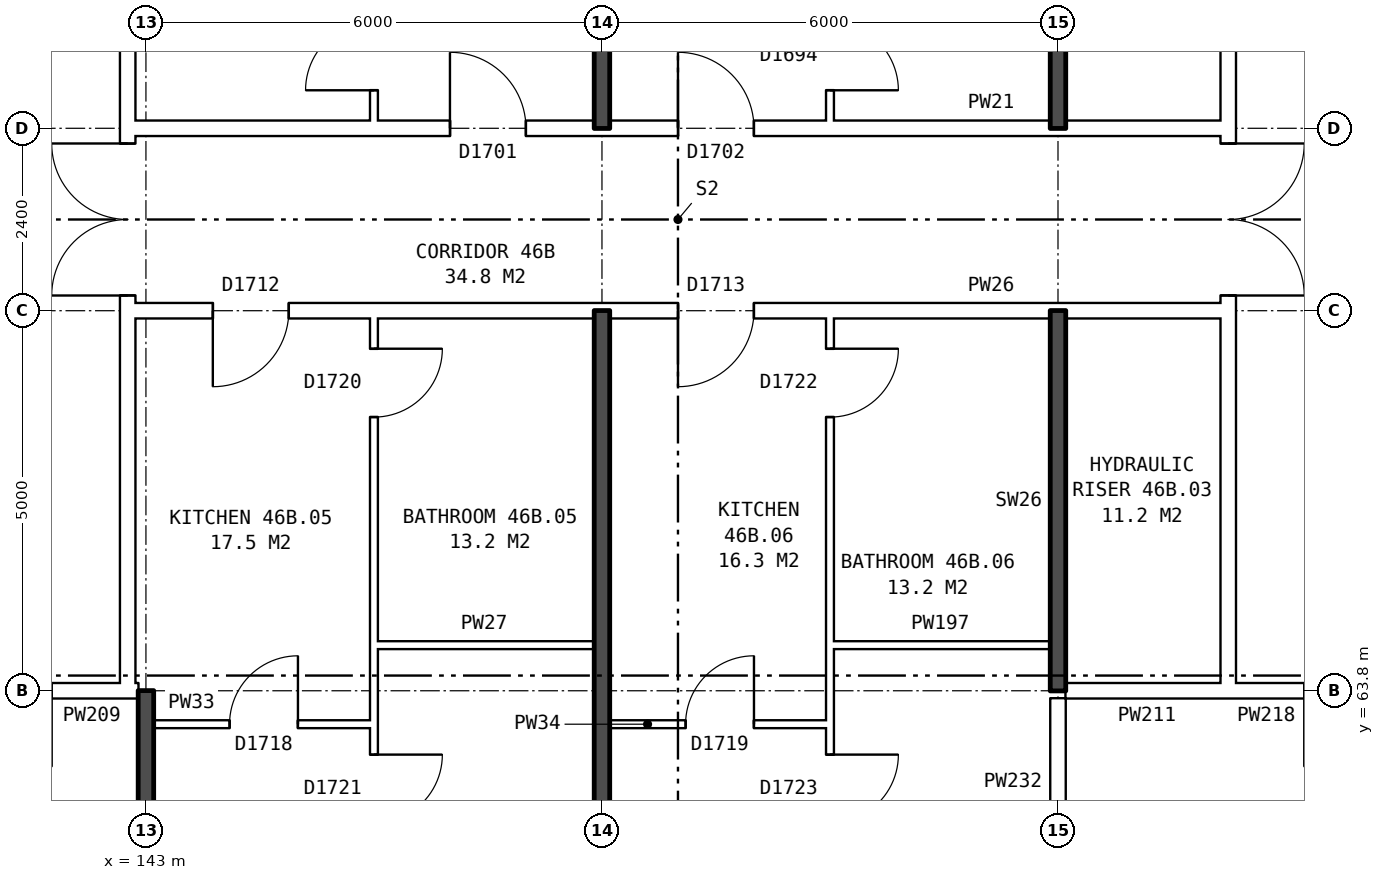
"""IFC4 building model, lengths in metres.
Left out: names, types, materials, properties, quantities, classifications, styles, units other than length and angle.
Written with IfcOpenShell. Run it as: python <this file> out.ifc"""

import sys

from ifc_helpers import new_model, si_unit, direction, frame, frame_2d, origin, place, context, subcontext, project, spatial, rectangle, extrude, element, fill, save


model = new_model("IFC4")
c1 = context("Model", 3, precision=1e-05, world=origin(), true_north=direction((0.0, 1.0)))
c2 = subcontext(c1, "Body", "Model", "MODEL_VIEW")
j1 = project(units=[si_unit("LENGTHUNIT", "METRE"), si_unit("PLANEANGLEUNIT", "RADIAN")], contexts=[c1])
p1 = place(None, origin())
s1 = spatial("IfcSite", under=j1, at=p1, CompositionType="ELEMENT")
p2 = place(p1, origin())
s2 = spatial("IfcBuilding", under=s1, at=p2, CompositionType="ELEMENT")
p3 = place(p2, frame((0.0, 0.0, 164.0)))
s3 = spatial("IfcBuildingStorey", under=s2, at=p3, CompositionType="ELEMENT", Elevation=164.0)
p4 = place(p3, frame((142.76, 63.9, 0.0), z_axis=(0.0, 0.0, 1.0), x_axis=(0.0, 1.0, 0.0)))
e1 = element("IfcWall", 1, at=p4, inside=s3, PredefinedType="PARTITIONING", context=c2, shape_type="SweptSolid", body=[
    extrude(rectangle(XDim=12.2, YDim=0.2, at=frame_2d((6.1, 0.0))), origin(), (0.0, 0.0, 1.0), 2.85),
])
p5 = place(p4, frame((5.1, 0.0, 0.0)))
e2 = element("IfcOpeningElement", 2, at=p5, cuts=e1, PredefinedType="OPENING", context=c2, shape_type="SweptSolid", body=[
    extrude(rectangle(XDim=2.0, YDim=2.1, at=frame_2d((1.0, 1.05))), frame((0.0, 0.11, 0.0), z_axis=(0.0, -1.0, 0.0), x_axis=(1.0, 0.0, 0.0)), (0.0, 0.0, 1.0), 0.22),
])
p6 = place(p3, frame((157.24, 63.9, 0.0), z_axis=(0.0, 0.0, 1.0), x_axis=(0.0, 1.0, 0.0)))
e3 = element("IfcWall", 3, at=p6, inside=s3, PredefinedType="PARTITIONING", context=c2, shape_type="SweptSolid", body=[
    extrude(rectangle(XDim=12.2, YDim=0.2, at=frame_2d((6.1, 0.0))), origin(), (0.0, 0.0, 1.0), 2.85),
])
p7 = place(p6, frame((5.1, 0.0, 0.0)))
e4 = element("IfcOpeningElement", 4, at=p7, cuts=e3, PredefinedType="OPENING", context=c2, shape_type="SweptSolid", body=[
    extrude(rectangle(XDim=2.0, YDim=2.1, at=frame_2d((1.0, 1.05))), frame((0.0, 0.11, 0.0), z_axis=(0.0, -1.0, 0.0), x_axis=(1.0, 0.0, 0.0)), (0.0, 0.0, 1.0), 0.22),
])
p8 = place(p3, frame((143.1, 63.36, 0.0), z_axis=(0.0, 0.0, 1.0), x_axis=(1.0, 0.0, 0.0)))
e5 = element("IfcWall", 5, at=p8, inside=s3, PredefinedType="PARTITIONING", context=c2, shape_type="SweptSolid", body=[
    extrude(rectangle(XDim=2.9, YDim=0.1, at=frame_2d((1.45, 0.0))), origin(), (0.0, 0.0, 1.0), 2.85),
])
p9 = place(p8, frame((1.0, 0.0, 0.0)))
e6 = element("IfcOpeningElement", 6, at=p9, cuts=e5, PredefinedType="OPENING", context=c2, shape_type="SweptSolid", body=[
    extrude(rectangle(XDim=0.9, YDim=2.1, at=frame_2d((0.45, 1.05))), frame((0.0, 0.06, 0.0), z_axis=(0.0, -1.0, 0.0), x_axis=(1.0, 0.0, 0.0)), (0.0, 0.0, 1.0), 0.12),
])
p10 = place(p3, frame((149.1, 63.36, 0.0), z_axis=(0.0, 0.0, 1.0), x_axis=(1.0, 0.0, 0.0)))
e7 = element("IfcWall", 7, at=p10, inside=s3, PredefinedType="PARTITIONING", context=c2, shape_type="SweptSolid", body=[
    extrude(rectangle(XDim=2.9, YDim=0.1, at=frame_2d((1.45, 0.0))), origin(), (0.0, 0.0, 1.0), 2.85),
])
p11 = place(p10, frame((1.0, 0.0, 0.0)))
e8 = element("IfcOpeningElement", 8, at=p11, cuts=e7, PredefinedType="OPENING", context=c2, shape_type="SweptSolid", body=[
    extrude(rectangle(XDim=0.9, YDim=2.1, at=frame_2d((0.45, 1.05))), frame((0.0, 0.06, 0.0), z_axis=(0.0, -1.0, 0.0), x_axis=(1.0, 0.0, 0.0)), (0.0, 0.0, 1.0), 0.12),
])
p12 = place(p3, frame((139.76, 63.8, 0.0), z_axis=(0.0, 0.0, 1.0), x_axis=(1.0, 0.0, 0.0)))
e9 = element("IfcWall", 9, at=p12, inside=s3, PredefinedType="PARTITIONING", context=c2, shape_type="SweptSolid", body=[
    extrude(rectangle(XDim=3.0, YDim=0.2, at=frame_2d((1.5, 0.0))), origin(), (0.0, 0.0, 1.0), 2.85),
])
p13 = place(p12, frame((1.0, 0.0, 0.0)))
e10 = element("IfcOpeningElement", 10, at=p13, cuts=e9, PredefinedType="OPENING", context=c2, shape_type="SweptSolid", body=[
    extrude(rectangle(XDim=1.0, YDim=2.1, at=frame_2d((0.5, 1.05))), frame((0.0, 0.11, 0.0), z_axis=(0.0, -1.0, 0.0), x_axis=(1.0, 0.0, 0.0)), (0.0, 0.0, 1.0), 0.22),
])
p14 = place(p3, frame((142.76, 63.8, 0.0), z_axis=(0.0, 0.0, 1.0), x_axis=(1.0, 0.0, 0.0)))
e11 = element("IfcWall", 11, at=p14, inside=s3, PredefinedType="PARTITIONING", context=c2, shape_type="SweptSolid", body=[
    extrude(rectangle(XDim=0.14, YDim=0.2, at=frame_2d((0.07, 0.0))), origin(), (0.0, 0.0, 1.0), 2.85),
])
p15 = place(p3, frame((155.1, 63.8, 0.0), z_axis=(0.0, 0.0, 1.0), x_axis=(1.0, 0.0, 0.0)))
e12 = element("IfcWall", 12, at=p15, inside=s3, PredefinedType="PARTITIONING", context=c2, shape_type="SweptSolid", body=[
    extrude(rectangle(XDim=2.14, YDim=0.2, at=frame_2d((1.07, 0.0))), origin(), (0.0, 0.0, 1.0), 2.85),
])
p16 = place(p3, frame((157.24, 63.8, 0.0), z_axis=(0.0, 0.0, 1.0), x_axis=(1.0, 0.0, 0.0)))
e13 = element("IfcWall", 13, at=p16, inside=s3, PredefinedType="PARTITIONING", context=c2, shape_type="SweptSolid", body=[
    extrude(rectangle(XDim=3.0, YDim=0.2, at=frame_2d((1.5, 0.0))), origin(), (0.0, 0.0, 1.0), 2.85),
])
p17 = place(p16, frame((1.0, 0.0, 0.0)))
e14 = element("IfcOpeningElement", 14, at=p17, cuts=e13, PredefinedType="OPENING", context=c2, shape_type="SweptSolid", body=[
    extrude(rectangle(XDim=1.0, YDim=2.1, at=frame_2d((0.5, 1.05))), frame((0.0, 0.11, 0.0), z_axis=(0.0, -1.0, 0.0), x_axis=(1.0, 0.0, 0.0)), (0.0, 0.0, 1.0), 0.22),
])
for number, where, z_axis, x_axis in (
    (15, (146.0, 64.4, 0.0), (0.0, 0.0, 1.0), (1.0, 0.0, 0.0)),
    (16, (152.0, 64.4, 0.0), (0.0, 0.0, 1.0), (1.0, 0.0, 0.0)),
):
    element("IfcWall", number, at=place(p3, frame(where, z_axis=z_axis, x_axis=x_axis)), inside=s3, PredefinedType="PARTITIONING", context=c2, shape_type="SweptSolid", body=[
        extrude(rectangle(XDim=2.9, YDim=0.1, at=frame_2d((1.45, 0.0))), origin(), (0.0, 0.0, 1.0), 2.85),
    ])
p18 = place(p3, frame((142.76, 68.8, 0.0), z_axis=(0.0, 0.0, 1.0), x_axis=(1.0, 0.0, 0.0)))
e17 = element("IfcWall", 17, at=p18, inside=s3, PredefinedType="PARTITIONING", context=c2, shape_type="SweptSolid", body=[
    extrude(rectangle(XDim=14.48, YDim=0.2, at=frame_2d((7.24, 0.0))), origin(), (0.0, 0.0, 1.0), 2.85),
])
p19 = place(p18, frame((1.12, 0.0, 0.0)))
e18 = element("IfcOpeningElement", 18, at=p19, cuts=e17, PredefinedType="OPENING", context=c2, shape_type="SweptSolid", body=[
    extrude(rectangle(XDim=1.0, YDim=2.1, at=frame_2d((0.5, 1.05))), frame((0.0, 0.11, 0.0), z_axis=(0.0, -1.0, 0.0), x_axis=(1.0, 0.0, 0.0)), (0.0, 0.0, 1.0), 0.22),
])
p20 = place(p18, frame((7.24, 0.0, 0.0)))
e19 = element("IfcOpeningElement", 19, at=p20, cuts=e17, PredefinedType="OPENING", context=c2, shape_type="SweptSolid", body=[
    extrude(rectangle(XDim=1.0, YDim=2.1, at=frame_2d((0.5, 1.05))), frame((0.0, 0.11, 0.0), z_axis=(0.0, -1.0, 0.0), x_axis=(1.0, 0.0, 0.0)), (0.0, 0.0, 1.0), 0.22),
])
p21 = place(p3, frame((142.76, 71.2, 0.0), z_axis=(0.0, 0.0, 1.0), x_axis=(1.0, 0.0, 0.0)))
e20 = element("IfcWall", 20, at=p21, inside=s3, PredefinedType="PARTITIONING", context=c2, shape_type="SweptSolid", body=[
    extrude(rectangle(XDim=14.48, YDim=0.2, at=frame_2d((7.24, 0.0))), origin(), (0.0, 0.0, 1.0), 2.85),
])
p22 = place(p21, frame((4.24, 0.0, 0.0)))
e21 = element("IfcOpeningElement", 21, at=p22, cuts=e20, PredefinedType="OPENING", context=c2, shape_type="SweptSolid", body=[
    extrude(rectangle(XDim=1.0, YDim=2.1, at=frame_2d((0.5, 1.05))), frame((0.0, 0.11, 0.0), z_axis=(0.0, -1.0, 0.0), x_axis=(1.0, 0.0, 0.0)), (0.0, 0.0, 1.0), 0.22),
])
p23 = place(p21, frame((7.24, 0.0, 0.0)))
e22 = element("IfcOpeningElement", 22, at=p23, cuts=e20, PredefinedType="OPENING", context=c2, shape_type="SweptSolid", body=[
    extrude(rectangle(XDim=1.0, YDim=2.1, at=frame_2d((0.5, 1.05))), frame((0.0, 0.11, 0.0), z_axis=(0.0, -1.0, 0.0), x_axis=(1.0, 0.0, 0.0)), (0.0, 0.0, 1.0), 0.22),
])
p24 = place(p3, frame((143.0, 54.36, 0.0), z_axis=(0.0, 0.0, 1.0), x_axis=(0.0, 1.0, 0.0)))
e23 = element("IfcWall", 23, at=p24, inside=s3, PredefinedType="SOLIDWALL", context=c2, shape_type="SweptSolid", body=[
    extrude(rectangle(XDim=9.44, YDim=0.2, at=frame_2d((4.72, 0.0))), origin(), (0.0, 0.0, 1.0), 2.85),
])
p25 = place(p3, frame((146.0, 54.36, 0.0), z_axis=(0.0, 0.0, 1.0), x_axis=(0.0, 1.0, 0.0)))
e24 = element("IfcWall", 24, at=p25, inside=s3, PredefinedType="PARTITIONING", context=c2, shape_type="SweptSolid", body=[
    extrude(rectangle(XDim=14.34, YDim=0.1, at=frame_2d((7.17, 0.0))), origin(), (0.0, 0.0, 1.0), 2.85),
])
p26 = place(p25, frame((7.7, 0.0, 0.0)))
e25 = element("IfcOpeningElement", 25, at=p26, cuts=e24, PredefinedType="OPENING", context=c2, shape_type="SweptSolid", body=[
    extrude(rectangle(XDim=0.9, YDim=2.1, at=frame_2d((0.45, 1.05))), frame((0.0, 0.06, 0.0), z_axis=(0.0, -1.0, 0.0), x_axis=(1.0, 0.0, 0.0)), (0.0, 0.0, 1.0), 0.12),
])
p27 = place(p25, frame((13.04, 0.0, 0.0)))
e26 = element("IfcOpeningElement", 26, at=p27, cuts=e24, PredefinedType="OPENING", context=c2, shape_type="SweptSolid", body=[
    extrude(rectangle(XDim=0.9, YDim=2.1, at=frame_2d((0.45, 1.05))), frame((0.0, 0.06, 0.0), z_axis=(0.0, -1.0, 0.0), x_axis=(1.0, 0.0, 0.0)), (0.0, 0.0, 1.0), 0.12),
])
p28 = place(p3, frame((146.0, 71.3, 0.0), z_axis=(0.0, 0.0, 1.0), x_axis=(0.0, 1.0, 0.0)))
e27 = element("IfcWall", 27, at=p28, inside=s3, PredefinedType="PARTITIONING", context=c2, shape_type="SweptSolid", body=[
    extrude(rectangle(XDim=14.34, YDim=0.1, at=frame_2d((7.17, 0.0))), origin(), (0.0, 0.0, 1.0), 2.85),
])
p29 = place(p28, frame((9.24, 0.0, 0.0)))
e28 = element("IfcOpeningElement", 28, at=p29, cuts=e27, PredefinedType="OPENING", context=c2, shape_type="SweptSolid", body=[
    extrude(rectangle(XDim=0.9, YDim=2.1, at=frame_2d((0.45, 1.05))), frame((0.0, 0.06, 0.0), z_axis=(0.0, -1.0, 0.0), x_axis=(1.0, 0.0, 0.0)), (0.0, 0.0, 1.0), 0.12),
])
p30 = place(p28, frame((0.4, 0.0, 0.0)))
e29 = element("IfcOpeningElement", 29, at=p30, cuts=e27, PredefinedType="OPENING", context=c2, shape_type="SweptSolid", body=[
    extrude(rectangle(XDim=0.9, YDim=2.1, at=frame_2d((0.45, 1.05))), frame((0.0, 0.06, 0.0), z_axis=(0.0, -1.0, 0.0), x_axis=(1.0, 0.0, 0.0)), (0.0, 0.0, 1.0), 0.12),
])
for number, where, z_axis, x_axis in (
    (30, (149.0, 54.36, 0.0), (0.0, 0.0, 1.0), (0.0, 1.0, 0.0)),
    (31, (149.0, 71.2, 0.0), (0.0, 0.0, 1.0), (0.0, 1.0, 0.0)),
):
    element("IfcWall", number, at=place(p3, frame(where, z_axis=z_axis, x_axis=x_axis)), inside=s3, PredefinedType="SOLIDWALL", context=c2, shape_type="SweptSolid", body=[
        extrude(rectangle(XDim=14.44, YDim=0.2, at=frame_2d((7.22, 0.0))), origin(), (0.0, 0.0, 1.0), 2.85),
    ])
p31 = place(p3, frame((152.0, 54.36, 0.0), z_axis=(0.0, 0.0, 1.0), x_axis=(0.0, 1.0, 0.0)))
e32 = element("IfcWall", 32, at=p31, inside=s3, PredefinedType="PARTITIONING", context=c2, shape_type="SweptSolid", body=[
    extrude(rectangle(XDim=14.34, YDim=0.1, at=frame_2d((7.17, 0.0))), origin(), (0.0, 0.0, 1.0), 2.85),
])
p32 = place(p31, frame((7.7, 0.0, 0.0)))
e33 = element("IfcOpeningElement", 33, at=p32, cuts=e32, PredefinedType="OPENING", context=c2, shape_type="SweptSolid", body=[
    extrude(rectangle(XDim=0.9, YDim=2.1, at=frame_2d((0.45, 1.05))), frame((0.0, 0.06, 0.0), z_axis=(0.0, -1.0, 0.0), x_axis=(1.0, 0.0, 0.0)), (0.0, 0.0, 1.0), 0.12),
])
p33 = place(p31, frame((13.04, 0.0, 0.0)))
e34 = element("IfcOpeningElement", 34, at=p33, cuts=e32, PredefinedType="OPENING", context=c2, shape_type="SweptSolid", body=[
    extrude(rectangle(XDim=0.9, YDim=2.1, at=frame_2d((0.45, 1.05))), frame((0.0, 0.06, 0.0), z_axis=(0.0, -1.0, 0.0), x_axis=(1.0, 0.0, 0.0)), (0.0, 0.0, 1.0), 0.12),
])
p34 = place(p3, frame((152.0, 71.3, 0.0), z_axis=(0.0, 0.0, 1.0), x_axis=(0.0, 1.0, 0.0)))
e35 = element("IfcWall", 35, at=p34, inside=s3, PredefinedType="PARTITIONING", context=c2, shape_type="SweptSolid", body=[
    extrude(rectangle(XDim=14.34, YDim=0.1, at=frame_2d((7.17, 0.0))), origin(), (0.0, 0.0, 1.0), 2.85),
])
p35 = place(p34, frame((9.24, 0.0, 0.0)))
e36 = element("IfcOpeningElement", 36, at=p35, cuts=e35, PredefinedType="OPENING", context=c2, shape_type="SweptSolid", body=[
    extrude(rectangle(XDim=0.9, YDim=2.1, at=frame_2d((0.45, 1.05))), frame((0.0, 0.06, 0.0), z_axis=(0.0, -1.0, 0.0), x_axis=(1.0, 0.0, 0.0)), (0.0, 0.0, 1.0), 0.12),
])
p36 = place(p34, frame((0.4, 0.0, 0.0)))
e37 = element("IfcOpeningElement", 37, at=p36, cuts=e35, PredefinedType="OPENING", context=c2, shape_type="SweptSolid", body=[
    extrude(rectangle(XDim=0.9, YDim=2.1, at=frame_2d((0.45, 1.05))), frame((0.0, 0.06, 0.0), z_axis=(0.0, -1.0, 0.0), x_axis=(1.0, 0.0, 0.0)), (0.0, 0.0, 1.0), 0.12),
])
p37 = place(p3, frame((155.0, 61.5, 0.0), z_axis=(0.0, 0.0, 1.0), x_axis=(0.0, 1.0, 0.0)))
e38 = element("IfcWall", 38, at=p37, inside=s3, PredefinedType="PARTITIONING", context=c2, shape_type="SweptSolid", body=[
    extrude(rectangle(XDim=2.2, YDim=0.2, at=frame_2d((1.1, 0.0))), origin(), (0.0, 0.0, 1.0), 2.85),
])
for number, where, z_axis, x_axis in (
    (39, (155.0, 63.8, 0.0), (0.0, 0.0, 1.0), (0.0, 1.0, 0.0)),
    (40, (155.0, 71.2, 0.0), (0.0, 0.0, 1.0), (0.0, 1.0, 0.0)),
):
    element("IfcWall", number, at=place(p3, frame(where, z_axis=z_axis, x_axis=x_axis)), inside=s3, PredefinedType="SOLIDWALL", context=c2, shape_type="SweptSolid", body=[
        extrude(rectangle(XDim=5.0, YDim=0.2, at=frame_2d((2.5, 0.0))), origin(), (0.0, 0.0, 1.0), 2.85),
    ])
p38 = place(p5, origin())
e41 = element("IfcDoor", 41, at=p38, inside=s3, OperationType="DOUBLE_DOOR_SINGLE_SWING", PredefinedType="DOOR", context=c2, shape_type="SweptSolid", body=[
    extrude(rectangle(XDim=2.0, YDim=2.1, at=frame_2d((1.0, 1.05))), frame((0.0, 0.025, 0.0), z_axis=(0.0, -1.0, 0.0), x_axis=(1.0, 0.0, 0.0)), (0.0, 0.0, 1.0), 0.05),
])
fill(e2, e41)
p39 = place(p7, frame((2.0, 0.0, 0.0), z_axis=(0.0, 0.0, 1.0), x_axis=(-1.0, 0.0, 0.0)))
e42 = element("IfcDoor", 42, at=p39, inside=s3, OperationType="DOUBLE_DOOR_SINGLE_SWING", PredefinedType="DOOR", context=c2, shape_type="SweptSolid", body=[
    extrude(rectangle(XDim=2.0, YDim=2.1, at=frame_2d((1.0, 1.05))), frame((0.0, 0.025, 0.0), z_axis=(0.0, -1.0, 0.0), x_axis=(1.0, 0.0, 0.0)), (0.0, 0.0, 1.0), 0.05),
])
fill(e4, e42)
p40 = place(p26, frame((0.9, 0.0, 0.0), z_axis=(0.0, 0.0, 1.0), x_axis=(-1.0, 0.0, 0.0)))
e43 = element("IfcDoor", 43, at=p40, inside=s3, OperationType="SINGLE_SWING_LEFT", PredefinedType="DOOR", context=c2, shape_type="SweptSolid", body=[
    extrude(rectangle(XDim=0.9, YDim=2.1, at=frame_2d((0.45, 1.05))), frame((0.0, 0.025, 0.0), z_axis=(0.0, -1.0, 0.0), x_axis=(1.0, 0.0, 0.0)), (0.0, 0.0, 1.0), 0.05),
])
fill(e25, e43)
p41 = place(p19, frame((1.0, 0.0, 0.0), z_axis=(0.0, 0.0, 1.0), x_axis=(-1.0, 0.0, 0.0)))
e44 = element("IfcDoor", 44, at=p41, inside=s3, OperationType="SINGLE_SWING_RIGHT", PredefinedType="DOOR", context=c2, shape_type="SweptSolid", body=[
    extrude(rectangle(XDim=1.0, YDim=2.1, at=frame_2d((0.5, 1.05))), frame((0.0, 0.025, 0.0), z_axis=(0.0, -1.0, 0.0), x_axis=(1.0, 0.0, 0.0)), (0.0, 0.0, 1.0), 0.05),
])
fill(e18, e44)
p42 = place(p9, origin())
e45 = element("IfcDoor", 45, at=p42, inside=s3, OperationType="SINGLE_SWING_RIGHT", PredefinedType="DOOR", context=c2, shape_type="SweptSolid", body=[
    extrude(rectangle(XDim=0.9, YDim=2.1, at=frame_2d((0.45, 1.05))), frame((0.0, 0.025, 0.0), z_axis=(0.0, -1.0, 0.0), x_axis=(1.0, 0.0, 0.0)), (0.0, 0.0, 1.0), 0.05),
])
fill(e6, e45)
p43 = place(p27, frame((0.9, 0.0, 0.0), z_axis=(0.0, 0.0, 1.0), x_axis=(-1.0, 0.0, 0.0)))
e46 = element("IfcDoor", 46, at=p43, inside=s3, OperationType="SINGLE_SWING_LEFT", PredefinedType="DOOR", context=c2, shape_type="SweptSolid", body=[
    extrude(rectangle(XDim=0.9, YDim=2.1, at=frame_2d((0.45, 1.05))), frame((0.0, 0.025, 0.0), z_axis=(0.0, -1.0, 0.0), x_axis=(1.0, 0.0, 0.0)), (0.0, 0.0, 1.0), 0.05),
])
fill(e26, e46)
p44 = place(p32, frame((0.9, 0.0, 0.0), z_axis=(0.0, 0.0, 1.0), x_axis=(-1.0, 0.0, 0.0)))
e47 = element("IfcDoor", 47, at=p44, inside=s3, OperationType="SINGLE_SWING_LEFT", PredefinedType="DOOR", context=c2, shape_type="SweptSolid", body=[
    extrude(rectangle(XDim=0.9, YDim=2.1, at=frame_2d((0.45, 1.05))), frame((0.0, 0.025, 0.0), z_axis=(0.0, -1.0, 0.0), x_axis=(1.0, 0.0, 0.0)), (0.0, 0.0, 1.0), 0.05),
])
fill(e33, e47)
p45 = place(p20, frame((1.0, 0.0, 0.0), z_axis=(0.0, 0.0, 1.0), x_axis=(-1.0, 0.0, 0.0)))
e48 = element("IfcDoor", 48, at=p45, inside=s3, OperationType="SINGLE_SWING_RIGHT", PredefinedType="DOOR", context=c2, shape_type="SweptSolid", body=[
    extrude(rectangle(XDim=1.0, YDim=2.1, at=frame_2d((0.5, 1.05))), frame((0.0, 0.025, 0.0), z_axis=(0.0, -1.0, 0.0), x_axis=(1.0, 0.0, 0.0)), (0.0, 0.0, 1.0), 0.05),
])
fill(e19, e48)
p46 = place(p11, origin())
e49 = element("IfcDoor", 49, at=p46, inside=s3, OperationType="SINGLE_SWING_RIGHT", PredefinedType="DOOR", context=c2, shape_type="SweptSolid", body=[
    extrude(rectangle(XDim=0.9, YDim=2.1, at=frame_2d((0.45, 1.05))), frame((0.0, 0.025, 0.0), z_axis=(0.0, -1.0, 0.0), x_axis=(1.0, 0.0, 0.0)), (0.0, 0.0, 1.0), 0.05),
])
fill(e8, e49)
p47 = place(p33, frame((0.9, 0.0, 0.0), z_axis=(0.0, 0.0, 1.0), x_axis=(-1.0, 0.0, 0.0)))
e50 = element("IfcDoor", 50, at=p47, inside=s3, OperationType="SINGLE_SWING_LEFT", PredefinedType="DOOR", context=c2, shape_type="SweptSolid", body=[
    extrude(rectangle(XDim=0.9, YDim=2.1, at=frame_2d((0.45, 1.05))), frame((0.0, 0.025, 0.0), z_axis=(0.0, -1.0, 0.0), x_axis=(1.0, 0.0, 0.0)), (0.0, 0.0, 1.0), 0.05),
])
fill(e34, e50)
p48 = place(p22, origin())
e51 = element("IfcDoor", 51, at=p48, inside=s3, OperationType="SINGLE_SWING_LEFT", PredefinedType="DOOR", context=c2, shape_type="SweptSolid", body=[
    extrude(rectangle(XDim=1.0, YDim=2.1, at=frame_2d((0.5, 1.05))), frame((0.0, 0.025, 0.0), z_axis=(0.0, -1.0, 0.0), x_axis=(1.0, 0.0, 0.0)), (0.0, 0.0, 1.0), 0.05),
])
fill(e21, e51)
p49 = place(p30, origin())
e52 = element("IfcDoor", 52, at=p49, inside=s3, OperationType="SINGLE_SWING_LEFT", PredefinedType="DOOR", context=c2, shape_type="SweptSolid", body=[
    extrude(rectangle(XDim=0.9, YDim=2.1, at=frame_2d((0.45, 1.05))), frame((0.0, 0.025, 0.0), z_axis=(0.0, -1.0, 0.0), x_axis=(1.0, 0.0, 0.0)), (0.0, 0.0, 1.0), 0.05),
])
fill(e29, e52)
p50 = place(p23, origin())
e53 = element("IfcDoor", 53, at=p50, inside=s3, OperationType="SINGLE_SWING_LEFT", PredefinedType="DOOR", context=c2, shape_type="SweptSolid", body=[
    extrude(rectangle(XDim=1.0, YDim=2.1, at=frame_2d((0.5, 1.05))), frame((0.0, 0.025, 0.0), z_axis=(0.0, -1.0, 0.0), x_axis=(1.0, 0.0, 0.0)), (0.0, 0.0, 1.0), 0.05),
])
fill(e22, e53)
p51 = place(p36, frame((0.9, 0.0, 0.0), z_axis=(0.0, 0.0, 1.0), x_axis=(-1.0, 0.0, 0.0)))
e54 = element("IfcDoor", 54, at=p51, inside=s3, OperationType="SINGLE_SWING_RIGHT", PredefinedType="DOOR", context=c2, shape_type="SweptSolid", body=[
    extrude(rectangle(XDim=0.9, YDim=2.1, at=frame_2d((0.45, 1.05))), frame((0.0, 0.025, 0.0), z_axis=(0.0, -1.0, 0.0), x_axis=(1.0, 0.0, 0.0)), (0.0, 0.0, 1.0), 0.05),
])
fill(e37, e54)
save(model, sys.argv[1])
